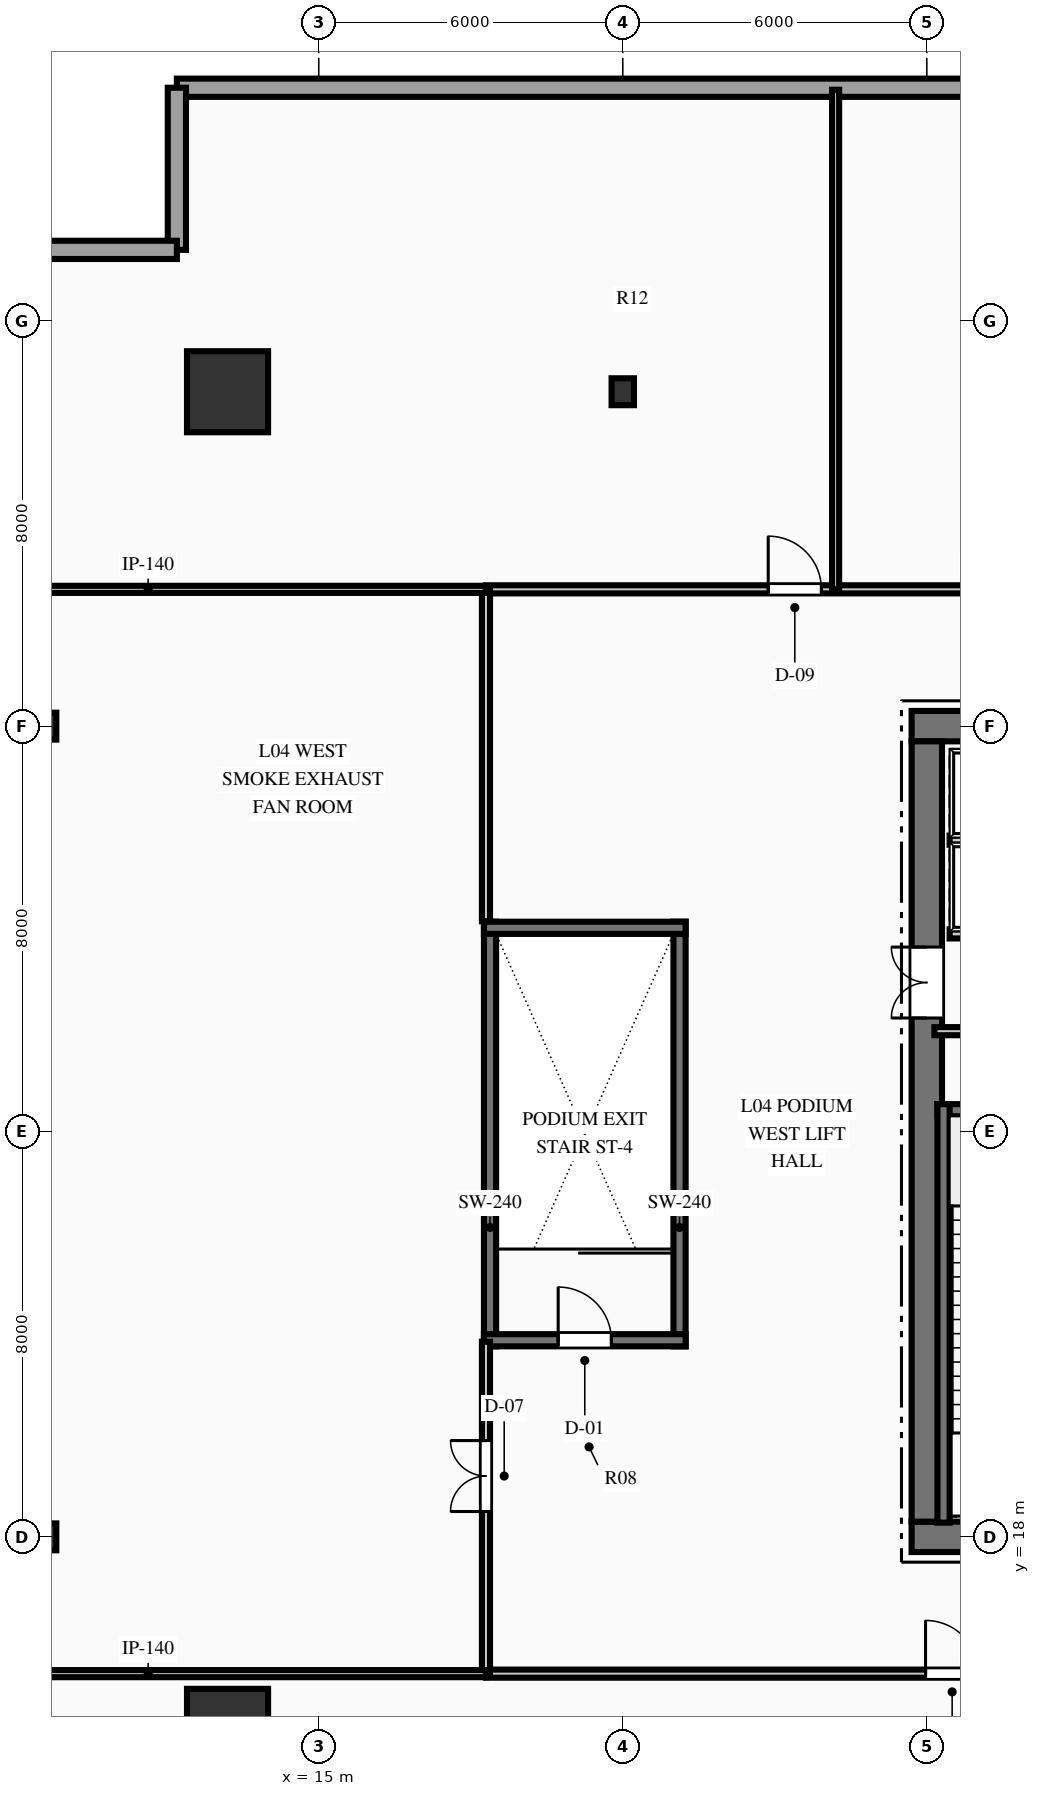
"""IFC4 building model, lengths in metres.
Left out: names, types, materials, properties, quantities, classifications, styles, units other than length and angle.
Written with IfcOpenShell. Run it as: python <this file> out.ifc"""

import sys

from ifc_helpers import new_model, si_unit, direction, frame, frame_2d, origin, origin_2d, place, context, subcontext, project, spatial, rectangle, hollow_rectangle, i_section, extrude, element, fill, save


model = new_model("IFC4")
c1 = context("Model", 3, precision=1e-05, world=origin(), true_north=direction((0.0, 1.0)))
c2 = subcontext(c1, "Body", "Model", "MODEL_VIEW")
j1 = project(units=[si_unit("LENGTHUNIT", "METRE"), si_unit("PLANEANGLEUNIT", "RADIAN")], contexts=[c1])
p1 = place(None, origin())
s1 = spatial("IfcSite", under=j1, at=p1, CompositionType="ELEMENT")
p2 = place(p1, origin())
s2 = spatial("IfcBuilding", under=s1, at=p2, CompositionType="ELEMENT")
p3 = place(p2, frame((0.0, 0.0, 22.2)))
s3 = spatial("IfcBuildingStorey", under=s2, at=p3, CompositionType="ELEMENT", Elevation=22.2)
p4 = place(p3, frame((26.7, 18.0, 0.0), z_axis=(0.0, 0.0, 1.0), x_axis=(1.0, 0.0, 0.0)))
e1 = element("IfcWall", 1, at=p4, inside=s3, PredefinedType="SHEAR", context=c2, shape_type="SweptSolid", body=[
    extrude(rectangle(XDim=18.6, YDim=0.6, at=frame_2d((9.3, 0.0))), origin(), (0.0, 0.0, 1.0), 6.0),
])
p5 = place(p4, frame((7.4, 0.0, 0.0)))
e2 = element("IfcOpeningElement", 2, at=p5, cuts=e1, PredefinedType="OPENING", context=c2, shape_type="SweptSolid", body=[
    extrude(rectangle(XDim=1.1, YDim=2.15, at=frame_2d((0.55, 1.075))), frame((0.0, 0.31, 0.0), z_axis=(0.0, -1.0, 0.0), x_axis=(1.0, 0.0, 0.0)), (0.0, 0.0, 1.0), 0.62),
])
p6 = place(p4, frame((9.58, 0.0, 0.0)))
e3 = element("IfcOpeningElement", 3, at=p6, cuts=e1, PredefinedType="OPENING", context=c2, shape_type="SweptSolid", body=[
    extrude(rectangle(XDim=1.1, YDim=2.15, at=frame_2d((0.55, 1.075))), frame((0.0, 0.31, 0.0), z_axis=(0.0, -1.0, 0.0), x_axis=(1.0, 0.0, 0.0)), (0.0, 0.0, 1.0), 0.62),
])
p7 = place(p3, frame((26.7, 34.0, 0.0), z_axis=(0.0, 0.0, 1.0), x_axis=(1.0, 0.0, 0.0)))
e4 = element("IfcWall", 4, at=p7, inside=s3, PredefinedType="SHEAR", context=c2, shape_type="SweptSolid", body=[
    extrude(rectangle(XDim=18.6, YDim=0.6, at=frame_2d((9.3, 0.0))), origin(), (0.0, 0.0, 1.0), 6.0),
])
p8 = place(p7, frame((1.265, 0.0, 0.0)))
e5 = element("IfcOpeningElement", 5, at=p8, cuts=e4, PredefinedType="OPENING", context=c2, shape_type="SweptSolid", body=[
    extrude(rectangle(XDim=1.1, YDim=2.15, at=frame_2d((0.55, 1.075))), frame((0.0, 0.31, 0.0), z_axis=(0.0, -1.0, 0.0), x_axis=(1.0, 0.0, 0.0)), (0.0, 0.0, 1.0), 0.62),
])
p9 = place(p7, frame((3.515, 0.0, 0.0)))
e6 = element("IfcOpeningElement", 6, at=p9, cuts=e4, PredefinedType="OPENING", context=c2, shape_type="SweptSolid", body=[
    extrude(rectangle(XDim=1.1, YDim=2.15, at=frame_2d((0.55, 1.075))), frame((0.0, 0.31, 0.0), z_axis=(0.0, -1.0, 0.0), x_axis=(1.0, 0.0, 0.0)), (0.0, 0.0, 1.0), 0.62),
])
p10 = place(p7, frame((13.985, 0.0, 0.0)))
e7 = element("IfcOpeningElement", 7, at=p10, cuts=e4, PredefinedType="OPENING", context=c2, shape_type="SweptSolid", body=[
    extrude(rectangle(XDim=1.1, YDim=2.15, at=frame_2d((0.55, 1.075))), frame((0.0, 0.31, 0.0), z_axis=(0.0, -1.0, 0.0), x_axis=(1.0, 0.0, 0.0)), (0.0, 0.0, 1.0), 0.62),
])
p11 = place(p7, frame((16.235, 0.0, 0.0)))
e8 = element("IfcOpeningElement", 8, at=p11, cuts=e4, PredefinedType="OPENING", context=c2, shape_type="SweptSolid", body=[
    extrude(rectangle(XDim=1.1, YDim=2.15, at=frame_2d((0.55, 1.075))), frame((0.0, 0.31, 0.0), z_axis=(0.0, -1.0, 0.0), x_axis=(1.0, 0.0, 0.0)), (0.0, 0.0, 1.0), 0.62),
])
p12 = place(p3, frame((27.0, 18.3, 0.0), z_axis=(0.0, 0.0, 1.0), x_axis=(0.0, 1.0, 0.0)))
e9 = element("IfcWall", 9, at=p12, inside=s3, PredefinedType="SHEAR", context=c2, shape_type="SweptSolid", body=[
    extrude(rectangle(XDim=15.4, YDim=0.6, at=frame_2d((7.7, 0.0))), origin(), (0.0, 0.0, 1.0), 6.0),
])
p13 = place(p12, frame((9.94, 0.0, 0.0)))
e10 = element("IfcOpeningElement", 10, at=p13, cuts=e9, PredefinedType="OPENING", context=c2, shape_type="SweptSolid", body=[
    extrude(rectangle(XDim=1.4, YDim=2.2, at=frame_2d((0.7, 1.1))), frame((0.0, 0.31, 0.0), z_axis=(0.0, -1.0, 0.0), x_axis=(1.0, 0.0, 0.0)), (0.0, 0.0, 1.0), 0.62),
])
p14 = place(p3, frame((27.21, 26.42, 0.0), z_axis=(0.0, 0.0, 1.0), x_axis=(1.0, 0.0, 0.0)))
e11 = element("IfcWall", 11, at=p14, inside=s3, PredefinedType="SHEAR", context=c2, shape_type="SweptSolid", body=[
    extrude(rectangle(XDim=3.98, YDim=0.24, at=frame_2d((1.99, 0.0))), origin(), (0.0, 0.0, 1.0), 6.0),
])
p15 = place(p3, frame((27.33, 18.28, 0.0), z_axis=(0.0, 0.0, 1.0), x_axis=(0.0, 1.0, 0.0)))
e12 = element("IfcWall", 12, at=p15, inside=s3, PredefinedType="SHEAR", context=c2, shape_type="SweptSolid", body=[
    extrude(rectangle(XDim=8.26, YDim=0.24, at=frame_2d((4.13, 0.0))), origin(), (0.0, 0.0, 1.0), 6.0),
])
for number, where, z_axis, x_axis in (
    (13, (18.38, 21.76, 0.0), (0.0, 0.0, 1.0), (0.0, 1.0, 0.0)),
    (14, (22.12, 21.76, 0.0), (0.0, 0.0, 1.0), (0.0, 1.0, 0.0)),
):
    element("IfcWall", number, at=place(p3, frame(where, z_axis=z_axis, x_axis=x_axis)), inside=s3, PredefinedType="SHEAR", context=c2, shape_type="SweptSolid", body=[
        extrude(rectangle(XDim=8.38, YDim=0.24, at=frame_2d((4.19, 0.0))), origin(), (0.0, 0.0, 1.0), 6.0),
    ])
p16 = place(p3, frame((18.26, 21.88, 0.0), z_axis=(0.0, 0.0, 1.0), x_axis=(1.0, 0.0, 0.0)))
e15 = element("IfcWall", 15, at=p16, inside=s3, PredefinedType="SHEAR", context=c2, shape_type="SweptSolid", body=[
    extrude(rectangle(XDim=3.98, YDim=0.24, at=frame_2d((1.99, 0.0))), origin(), (0.0, 0.0, 1.0), 6.0),
])
p17 = place(p16, frame((1.465, 0.0, 0.0)))
e16 = element("IfcOpeningElement", 16, at=p17, cuts=e15, PredefinedType="OPENING", context=c2, shape_type="SweptSolid", body=[
    extrude(rectangle(XDim=1.05, YDim=2.15, at=frame_2d((0.525, 1.075))), frame((0.0, 0.13, 0.0), z_axis=(0.0, -1.0, 0.0), x_axis=(1.0, 0.0, 0.0)), (0.0, 0.0, 1.0), 0.26),
])
p18 = place(p3, frame((18.26, 30.02, 0.0), z_axis=(0.0, 0.0, 1.0), x_axis=(1.0, 0.0, 0.0)))
e17 = element("IfcWall", 17, at=p18, inside=s3, PredefinedType="SHEAR", context=c2, shape_type="SweptSolid", body=[
    extrude(rectangle(XDim=3.98, YDim=0.24, at=frame_2d((1.99, 0.0))), origin(), (0.0, 0.0, 1.0), 6.0),
])
for number, where, z_axis, x_axis in (
    (18, (13.2, 14.2, 0.0), (0.0, 0.0, 1.0), (1.0, 0.0, 0.0)),
    (19, (13.2, 40.6, 0.0), (0.0, 0.0, 1.0), (1.0, 0.0, 0.0)),
):
    element("IfcColumn", number, at=place(p3, frame(where, z_axis=z_axis, x_axis=x_axis)), inside=s3, PredefinedType="COLUMN", context=c2, shape_type="SweptSolid", body=[
        extrude(hollow_rectangle(XDim=1.6, YDim=1.6, WallThickness=0.08, at=origin_2d()), origin(), (0.0, 0.0, 1.0), 6.0),
    ])
for number, where, z_axis, x_axis in (
    (20, (9.6, 18.0, 0.0), (0.0, 0.0, 1.0), (1.0, 0.0, 0.0)),
    (21, (9.6, 34.0, 0.0), (0.0, 0.0, 1.0), (1.0, 0.0, 0.0)),
    (22, (21.0, 40.6, 0.0), (0.0, 0.0, 1.0), (1.0, 0.0, 0.0)),
):
    element("IfcColumn", number, at=place(p3, frame(where, z_axis=z_axis, x_axis=x_axis)), inside=s3, PredefinedType="COLUMN", context=c2, shape_type="SweptSolid", body=[
        extrude(i_section(OverallWidth=0.442, OverallDepth=0.531, WebThickness=0.066, FlangeThickness=0.106, at=origin_2d()), origin(), (0.0, 0.0, 1.0), 6.0),
    ])
p19 = place(p3, frame((12.2, 46.6, 0.0), z_axis=(0.0, 0.0, 1.0), x_axis=(1.0, 0.0, 0.0)))
e23 = element("IfcWall", 23, at=p19, inside=s3, PredefinedType="STANDARD", context=c2, shape_type="SweptSolid", body=[
    extrude(rectangle(XDim=47.6, YDim=0.36, at=frame_2d((23.8, 0.0))), origin(), (0.0, 0.0, 1.0), 5.59),
])
p20 = place(p3, frame((12.2, 43.4, 0.0), z_axis=(0.0, 0.0, 1.0), x_axis=(0.0, 1.0, 0.0)))
e24 = element("IfcWall", 24, at=p20, inside=s3, PredefinedType="STANDARD", context=c2, shape_type="SweptSolid", body=[
    extrude(rectangle(XDim=3.2, YDim=0.36, at=frame_2d((1.6, 0.0))), origin(), (0.0, 0.0, 1.0), 5.59),
])
p21 = place(p3, frame((9.0, 43.4, 0.0), z_axis=(0.0, 0.0, 1.0), x_axis=(1.0, 0.0, 0.0)))
e25 = element("IfcWall", 25, at=p21, inside=s3, PredefinedType="STANDARD", context=c2, shape_type="SweptSolid", body=[
    extrude(rectangle(XDim=3.2, YDim=0.36, at=frame_2d((1.6, 0.0))), origin(), (0.0, 0.0, 1.0), 5.59),
])
p22 = place(p3, frame((27.15, 27.98, 0.0), z_axis=(0.0, 0.0, 1.0), x_axis=(1.0, 0.0, 0.0)))
e26 = element("IfcWall", 26, at=p22, inside=s3, PredefinedType="PARTITIONING", context=c2, shape_type="SweptSolid", body=[
    extrude(rectangle(XDim=4.05, YDim=0.16, at=frame_2d((2.025, 0.0))), origin(), (0.0, 0.0, 1.0), 5.59),
])
p23 = place(p22, frame((1.575, 0.0, 0.0)))
e27 = element("IfcOpeningElement", 27, at=p23, cuts=e26, PredefinedType="OPENING", context=c2, shape_type="SweptSolid", body=[
    extrude(rectangle(XDim=0.95, YDim=2.15, at=frame_2d((0.475, 1.075))), frame((0.0, 0.09, 0.0), z_axis=(0.0, -1.0, 0.0), x_axis=(1.0, 0.0, 0.0)), (0.0, 0.0, 1.0), 0.18),
])
p24 = place(p3, frame((27.45, 29.9, 0.0), z_axis=(0.0, 0.0, 1.0), x_axis=(1.0, 0.0, 0.0)))
e28 = element("IfcWall", 28, at=p24, inside=s3, PredefinedType="PARTITIONING", context=c2, shape_type="SweptSolid", body=[
    extrude(rectangle(XDim=4.43, YDim=0.18, at=frame_2d((2.215, 0.0))), origin(), (0.0, 0.0, 1.0), 5.59),
])
p25 = place(p24, frame((0.515, 0.0, 0.0)))
e29 = element("IfcOpeningElement", 29, at=p25, cuts=e28, PredefinedType="OPENING", context=c2, shape_type="SweptSolid", body=[
    extrude(rectangle(XDim=1.1, YDim=2.15, at=frame_2d((0.55, 1.075))), frame((0.0, 0.1, 0.0), z_axis=(0.0, -1.0, 0.0), x_axis=(1.0, 0.0, 0.0)), (0.0, 0.0, 1.0), 0.2),
])
p26 = place(p24, frame((2.765, 0.0, 0.0)))
e30 = element("IfcOpeningElement", 30, at=p26, cuts=e28, PredefinedType="OPENING", context=c2, shape_type="SweptSolid", body=[
    extrude(rectangle(XDim=1.1, YDim=2.15, at=frame_2d((0.55, 1.075))), frame((0.0, 0.1, 0.0), z_axis=(0.0, -1.0, 0.0), x_axis=(1.0, 0.0, 0.0)), (0.0, 0.0, 1.0), 0.2),
])
p27 = place(p3, frame((27.45, 31.75, 0.0), z_axis=(0.0, 0.0, 1.0), x_axis=(1.0, 0.0, 0.0)))
e31 = element("IfcWall", 31, at=p27, inside=s3, PredefinedType="PARTITIONING", context=c2, shape_type="SweptSolid", body=[
    extrude(rectangle(XDim=4.43, YDim=0.18, at=frame_2d((2.215, 0.0))), origin(), (0.0, 0.0, 1.0), 5.59),
])
p28 = place(p3, frame((18.3, 15.3, 0.0), z_axis=(0.0, 0.0, 1.0), x_axis=(1.0, 0.0, 0.0)))
e32 = element("IfcWall", 32, at=p28, inside=s3, PredefinedType="PARTITIONING", context=c2, shape_type="SweptSolid", body=[
    extrude(rectangle(XDim=35.4, YDim=0.16, at=frame_2d((17.7, 0.0))), origin(), (0.0, 0.0, 1.0), 5.59),
])
p29 = place(p28, frame((8.675, 0.0, 0.0)))
e33 = element("IfcOpeningElement", 33, at=p29, cuts=e32, PredefinedType="OPENING", context=c2, shape_type="SweptSolid", body=[
    extrude(rectangle(XDim=1.05, YDim=2.15, at=frame_2d((0.525, 1.075))), frame((0.0, 0.09, 0.0), z_axis=(0.0, -1.0, 0.0), x_axis=(1.0, 0.0, 0.0)), (0.0, 0.0, 1.0), 0.18),
])
p30 = place(p28, frame((16.85, 0.0, 0.0)))
e34 = element("IfcOpeningElement", 34, at=p30, cuts=e32, PredefinedType="OPENING", context=c2, shape_type="SweptSolid", body=[
    extrude(rectangle(XDim=1.4, YDim=2.2, at=frame_2d((0.7, 1.1))), frame((0.0, 0.09, 0.0), z_axis=(0.0, -1.0, 0.0), x_axis=(1.0, 0.0, 0.0)), (0.0, 0.0, 1.0), 0.18),
])
p31 = place(p28, frame((26.975, 0.0, 0.0)))
e35 = element("IfcOpeningElement", 35, at=p31, cuts=e32, PredefinedType="OPENING", context=c2, shape_type="SweptSolid", body=[
    extrude(rectangle(XDim=1.05, YDim=2.15, at=frame_2d((0.525, 1.075))), frame((0.0, 0.09, 0.0), z_axis=(0.0, -1.0, 0.0), x_axis=(1.0, 0.0, 0.0)), (0.0, 0.0, 1.0), 0.18),
])
p32 = place(p3, frame((18.3, 36.7, 0.0), z_axis=(0.0, 0.0, 1.0), x_axis=(1.0, 0.0, 0.0)))
e36 = element("IfcWall", 36, at=p32, inside=s3, PredefinedType="PARTITIONING", context=c2, shape_type="SweptSolid", body=[
    extrude(rectangle(XDim=35.4, YDim=0.16, at=frame_2d((17.7, 0.0))), origin(), (0.0, 0.0, 1.0), 5.59),
])
p33 = place(p32, frame((5.57, 0.0, 0.0)))
e37 = element("IfcOpeningElement", 37, at=p33, cuts=e36, PredefinedType="OPENING", context=c2, shape_type="SweptSolid", body=[
    extrude(rectangle(XDim=1.05, YDim=2.15, at=frame_2d((0.525, 1.075))), frame((0.0, 0.09, 0.0), z_axis=(0.0, -1.0, 0.0), x_axis=(1.0, 0.0, 0.0)), (0.0, 0.0, 1.0), 0.18),
])
p34 = place(p32, frame((17.225, 0.0, 0.0)))
e38 = element("IfcOpeningElement", 38, at=p34, cuts=e36, PredefinedType="OPENING", context=c2, shape_type="SweptSolid", body=[
    extrude(rectangle(XDim=1.05, YDim=2.15, at=frame_2d((0.525, 1.075))), frame((0.0, 0.09, 0.0), z_axis=(0.0, -1.0, 0.0), x_axis=(1.0, 0.0, 0.0)), (0.0, 0.0, 1.0), 0.18),
])
p35 = place(p32, frame((26.48, 0.0, 0.0)))
e39 = element("IfcOpeningElement", 39, at=p35, cuts=e36, PredefinedType="OPENING", context=c2, shape_type="SweptSolid", body=[
    extrude(rectangle(XDim=0.95, YDim=2.15, at=frame_2d((0.475, 1.075))), frame((0.0, 0.09, 0.0), z_axis=(0.0, -1.0, 0.0), x_axis=(1.0, 0.0, 0.0)), (0.0, 0.0, 1.0), 0.18),
])
p36 = place(p32, frame((30.275, 0.0, 0.0)))
e40 = element("IfcOpeningElement", 40, at=p36, cuts=e36, PredefinedType="OPENING", context=c2, shape_type="SweptSolid", body=[
    extrude(rectangle(XDim=0.95, YDim=2.15, at=frame_2d((0.475, 1.075))), frame((0.0, 0.09, 0.0), z_axis=(0.0, -1.0, 0.0), x_axis=(1.0, 0.0, 0.0)), (0.0, 0.0, 1.0), 0.18),
])
p37 = place(p32, frame((33.3, 0.0, 0.0)))
e41 = element("IfcOpeningElement", 41, at=p37, cuts=e36, PredefinedType="OPENING", context=c2, shape_type="SweptSolid", body=[
    extrude(rectangle(XDim=1.0, YDim=2.15, at=frame_2d((0.5, 1.075))), frame((0.0, 0.09, 0.0), z_axis=(0.0, -1.0, 0.0), x_axis=(1.0, 0.0, 0.0)), (0.0, 0.0, 1.0), 0.18),
])
p38 = place(p3, frame((18.3, 15.3, 0.0), z_axis=(0.0, 0.0, 1.0), x_axis=(0.0, 1.0, 0.0)))
e42 = element("IfcWall", 42, at=p38, inside=s3, PredefinedType="PARTITIONING", context=c2, shape_type="SweptSolid", body=[
    extrude(rectangle(XDim=6.55, YDim=0.16, at=frame_2d((3.275, 0.0))), origin(), (0.0, 0.0, 1.0), 5.59),
])
p39 = place(p38, frame((3.2, 0.0, 0.0)))
e43 = element("IfcOpeningElement", 43, at=p39, cuts=e42, PredefinedType="OPENING", context=c2, shape_type="SweptSolid", body=[
    extrude(rectangle(XDim=1.4, YDim=2.2, at=frame_2d((0.7, 1.1))), frame((0.0, 0.09, 0.0), z_axis=(0.0, -1.0, 0.0), x_axis=(1.0, 0.0, 0.0)), (0.0, 0.0, 1.0), 0.18),
])
p40 = place(p3, frame((18.3, 30.15, 0.0), z_axis=(0.0, 0.0, 1.0), x_axis=(0.0, 1.0, 0.0)))
e44 = element("IfcWall", 44, at=p40, inside=s3, PredefinedType="PARTITIONING", context=c2, shape_type="SweptSolid", body=[
    extrude(rectangle(XDim=6.55, YDim=0.16, at=frame_2d((3.275, 0.0))), origin(), (0.0, 0.0, 1.0), 5.59),
])
p41 = place(p3, frame((9.04, 15.3, 0.0), z_axis=(0.0, 0.0, 1.0), x_axis=(1.0, 0.0, 0.0)))
e45 = element("IfcWall", 45, at=p41, inside=s3, PredefinedType="PARTITIONING", context=c2, shape_type="SweptSolid", body=[
    extrude(rectangle(XDim=9.26, YDim=0.14, at=frame_2d((4.63, 0.0))), origin(), (0.0, 0.0, 1.0), 5.59),
])
p42 = place(p3, frame((9.04, 36.7, 0.0), z_axis=(0.0, 0.0, 1.0), x_axis=(1.0, 0.0, 0.0)))
e46 = element("IfcWall", 46, at=p42, inside=s3, PredefinedType="PARTITIONING", context=c2, shape_type="SweptSolid", body=[
    extrude(rectangle(XDim=9.26, YDim=0.14, at=frame_2d((4.63, 0.0))), origin(), (0.0, 0.0, 1.0), 4.889),
])
p43 = place(p3, frame((25.2, 36.7, 0.0), z_axis=(0.0, 0.0, 1.0), x_axis=(0.0, 1.0, 0.0)))
e47 = element("IfcWall", 47, at=p43, inside=s3, PredefinedType="PARTITIONING", context=c2, shape_type="SweptSolid", body=[
    extrude(rectangle(XDim=9.86, YDim=0.14, at=frame_2d((4.93, 0.0))), origin(), (0.0, 0.0, 1.0), 5.59),
])
p44 = place(p13, origin())
e48 = element("IfcDoor", 48, at=p44, inside=s3, OperationType="DOUBLE_DOOR_SINGLE_SWING", PredefinedType="DOOR", context=c2, shape_type="SweptSolid", body=[
    extrude(rectangle(XDim=1.4, YDim=2.2, at=frame_2d((0.7, 1.1))), frame((0.0, 0.025, 0.0), z_axis=(0.0, -1.0, 0.0), x_axis=(1.0, 0.0, 0.0)), (0.0, 0.0, 1.0), 0.05),
])
fill(e10, e48)
p45 = place(p17, origin())
e49 = element("IfcDoor", 49, at=p45, inside=s3, OperationType="SINGLE_SWING_LEFT", PredefinedType="DOOR", context=c2, shape_type="SweptSolid", body=[
    extrude(rectangle(XDim=1.05, YDim=2.15, at=frame_2d((0.525, 1.075))), frame((0.0, 0.025, 0.0), z_axis=(0.0, -1.0, 0.0), x_axis=(1.0, 0.0, 0.0)), (0.0, 0.0, 1.0), 0.05),
])
fill(e16, e49)
p46 = place(p29, origin())
e50 = element("IfcDoor", 50, at=p46, inside=s3, OperationType="SINGLE_SWING_LEFT", PredefinedType="DOOR", context=c2, shape_type="SweptSolid", body=[
    extrude(rectangle(XDim=1.05, YDim=2.15, at=frame_2d((0.525, 1.075))), frame((0.0, 0.025, 0.0), z_axis=(0.0, -1.0, 0.0), x_axis=(1.0, 0.0, 0.0)), (0.0, 0.0, 1.0), 0.05),
])
fill(e33, e50)
p47 = place(p33, origin())
e51 = element("IfcDoor", 51, at=p47, inside=s3, OperationType="SINGLE_SWING_LEFT", PredefinedType="DOOR", context=c2, shape_type="SweptSolid", body=[
    extrude(rectangle(XDim=1.05, YDim=2.15, at=frame_2d((0.525, 1.075))), frame((0.0, 0.025, 0.0), z_axis=(0.0, -1.0, 0.0), x_axis=(1.0, 0.0, 0.0)), (0.0, 0.0, 1.0), 0.05),
])
fill(e37, e51)
p48 = place(p39, origin())
e52 = element("IfcDoor", 52, at=p48, inside=s3, OperationType="DOUBLE_DOOR_SINGLE_SWING", PredefinedType="DOOR", context=c2, shape_type="SweptSolid", body=[
    extrude(rectangle(XDim=1.4, YDim=2.2, at=frame_2d((0.7, 1.1))), frame((0.0, 0.025, 0.0), z_axis=(0.0, -1.0, 0.0), x_axis=(1.0, 0.0, 0.0)), (0.0, 0.0, 1.0), 0.05),
])
fill(e43, e52)
save(model, sys.argv[1])
